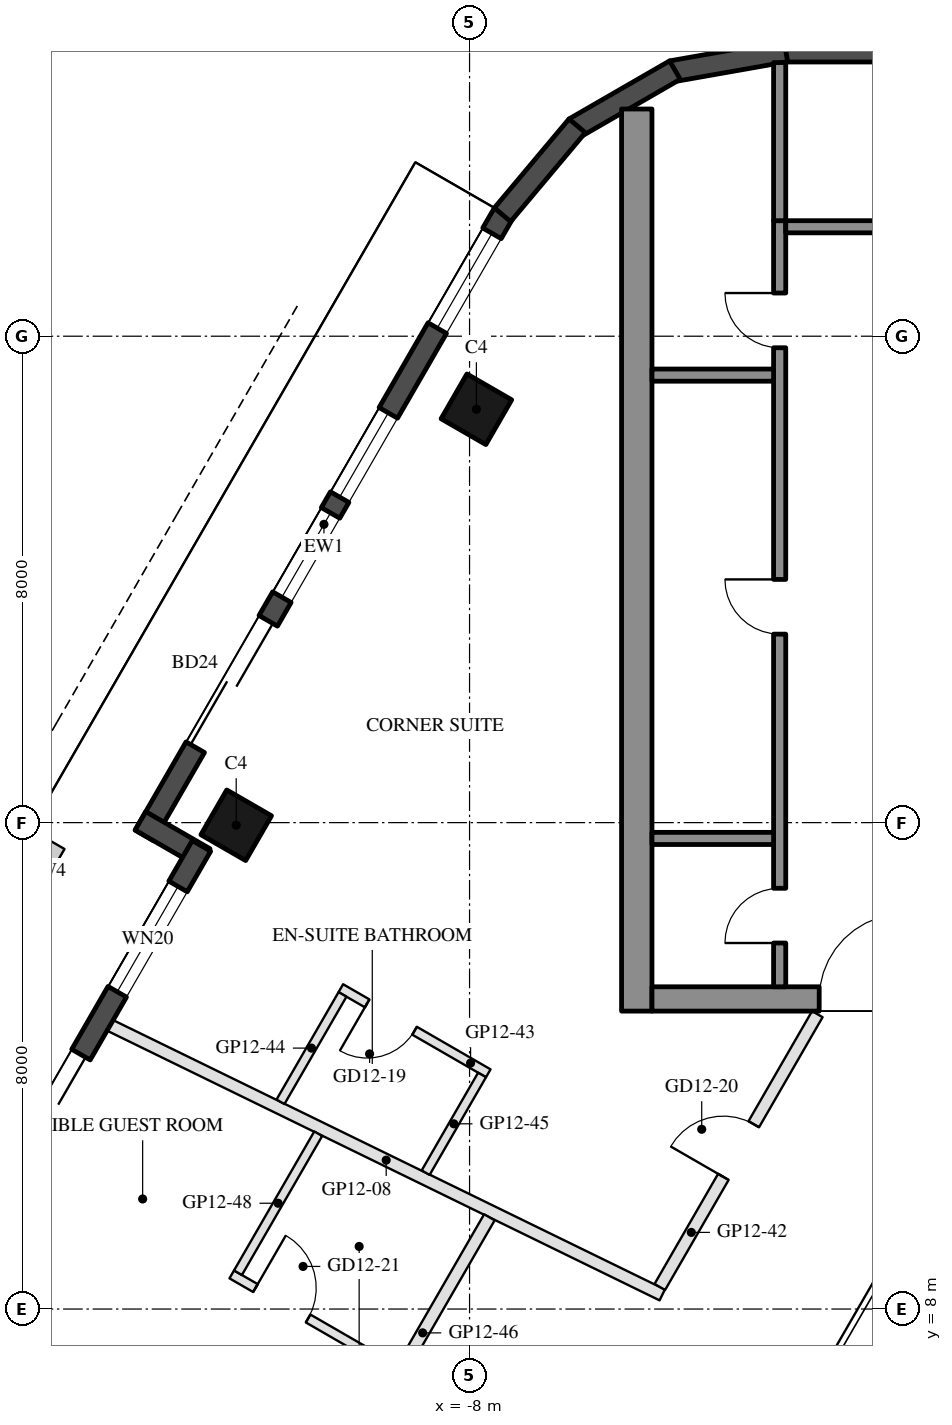
"""IFC4 building model, lengths in metres.
Left out: names, types, materials, properties, quantities, classifications, styles, units other than length and angle.
Written with IfcOpenShell. Run it as: python <this file> out.ifc"""

import sys

from ifc_helpers import new_model, si_unit, direction, frame, frame_2d, origin, origin_2d, place, context, subcontext, project, spatial, rectangle, hollow_rectangle, extrude, element, fill, save


model = new_model("IFC4")
c1 = context("Model", 3, precision=1e-05, world=origin(), true_north=direction((0.0, 1.0)))
c2 = subcontext(c1, "Body", "Model", "MODEL_VIEW")
j1 = project(units=[si_unit("LENGTHUNIT", "METRE"), si_unit("PLANEANGLEUNIT", "RADIAN")], contexts=[c1])
p1 = place(None, origin())
s1 = spatial("IfcSite", under=j1, at=p1, CompositionType="ELEMENT")
p2 = place(p1, origin())
s2 = spatial("IfcBuilding", under=s1, at=p2, CompositionType="ELEMENT")
p3 = place(p2, frame((0.0, 0.0, 146.6)))
s3 = spatial("IfcBuildingStorey", under=s2, at=p3, CompositionType="ELEMENT", Elevation=146.6)
for number, where, z_axis, x_axis in (
    (1, (-7.888, 22.798, 0.0), (0.0, 0.0, 1.0), (0.5, 0.866, 0.0)),
    (2, (-11.838, 15.957, 0.0), (0.0, 0.0, 1.0), (0.5, 0.866, 0.0)),
):
    element("IfcColumn", number, at=place(p3, frame(where, z_axis=z_axis, x_axis=x_axis)), inside=s3, PredefinedType="COLUMN", context=c2, shape_type="SweptSolid", body=[
        extrude(hollow_rectangle(XDim=0.85, YDim=0.85, WallThickness=0.04, at=origin_2d()), origin(), (0.0, 0.0, 1.0), 3.7),
    ])
p4 = place(p3, frame((-7.441, 26.022, 0.0), z_axis=(0.0, 0.0, 1.0), x_axis=(-0.499992533062, -0.86602971478, 0.0)))
e3 = element("IfcWall", 3, at=p4, inside=s3, PredefinedType="SOLIDWALL", context=c2, shape_type="SweptSolid", body=[
    extrude(rectangle(XDim=11.816, YDim=0.35, at=frame_2d((5.908, 0.0))), origin(), (0.0, 0.0, 1.0), 3.55),
])
p5 = place(p4, frame((0.381, 0.0, 0.3)))
e4 = element("IfcOpeningElement", 4, at=p5, cuts=e3, PredefinedType="OPENING", context=c2, shape_type="SweptSolid", body=[
    extrude(rectangle(XDim=1.8, YDim=2.65, at=frame_2d((0.9, 1.325))), frame((0.0, 0.185, 0.0), z_axis=(0.0, -1.0, 0.0), x_axis=(1.0, 0.0, 0.0)), (0.0, 0.0, 1.0), 0.37),
])
p6 = place(p4, frame((7.74, 0.0, 0.0)))
e5 = element("IfcOpeningElement", 5, at=p6, cuts=e3, PredefinedType="OPENING", context=c2, shape_type="SweptSolid", body=[
    extrude(rectangle(XDim=2.4, YDim=2.4, at=frame_2d((1.2, 1.2))), frame((0.0, 0.185, 0.0), z_axis=(0.0, -1.0, 0.0), x_axis=(1.0, 0.0, 0.0)), (0.0, 0.0, 1.0), 0.37),
])
p7 = place(p4, frame((3.791, 0.0, 0.3)))
e6 = element("IfcOpeningElement", 6, at=p7, cuts=e3, PredefinedType="OPENING", context=c2, shape_type="SweptSolid", body=[
    extrude(rectangle(XDim=1.6, YDim=2.65, at=frame_2d((0.8, 1.325))), frame((0.0, 0.185, 0.0), z_axis=(0.0, -1.0, 0.0), x_axis=(1.0, 0.0, 0.0)), (0.0, 0.0, 1.0), 0.37),
])
p8 = place(p4, frame((5.691, 0.0, 0.3)))
e7 = element("IfcOpeningElement", 7, at=p8, cuts=e3, PredefinedType="OPENING", context=c2, shape_type="SweptSolid", body=[
    extrude(rectangle(XDim=1.6, YDim=2.65, at=frame_2d((0.8, 1.325))), frame((0.0, 0.185, 0.0), z_axis=(0.0, -1.0, 0.0), x_axis=(1.0, 0.0, 0.0)), (0.0, 0.0, 1.0), 0.37),
])
p9 = place(p3, frame((-13.413, 16.029, 0.0), z_axis=(0.0, 0.0, 1.0), x_axis=(0.866005645448, -0.500034220881, 0.0)))
e8 = element("IfcWall", 8, at=p9, inside=s3, PredefinedType="SOLIDWALL", context=c2, shape_type="SweptSolid", body=[
    extrude(rectangle(XDim=1.22, YDim=0.35, at=frame_2d((0.61, 0.0))), origin(), (0.0, 0.0, 1.0), 3.55),
])
p10 = place(p3, frame((-12.409, 15.617, 0.0), z_axis=(0.0, 0.0, 1.0), x_axis=(-0.500003597184, -0.866023326939, 0.0)))
e9 = element("IfcWall", 9, at=p10, inside=s3, PredefinedType="SOLIDWALL", context=c2, shape_type="SweptSolid", body=[
    extrude(rectangle(XDim=6.74, YDim=0.35, at=frame_2d((3.37, 0.0))), origin(), (0.0, 0.0, 1.0), 3.55),
])
p11 = place(p10, frame((0.77, 0.0, 0.3)))
e10 = element("IfcOpeningElement", 10, at=p11, cuts=e9, PredefinedType="OPENING", context=c2, shape_type="SweptSolid", body=[
    extrude(rectangle(XDim=2.0, YDim=2.65, at=frame_2d((1.0, 1.325))), frame((0.0, 0.185, 0.0), z_axis=(0.0, -1.0, 0.0), x_axis=(1.0, 0.0, 0.0)), (0.0, 0.0, 1.0), 0.37),
])
p12 = place(p10, frame((3.964, 0.0, 0.0)))
e11 = element("IfcOpeningElement", 11, at=p12, cuts=e9, PredefinedType="OPENING", context=c2, shape_type="SweptSolid", body=[
    extrude(rectangle(XDim=1.8, YDim=2.4, at=frame_2d((0.9, 1.2))), frame((0.0, 0.185, 0.0), z_axis=(0.0, -1.0, 0.0), x_axis=(1.0, 0.0, 0.0)), (0.0, 0.0, 1.0), 0.37),
])
p13 = place(p3, frame((2.829, 28.685, 0.0), z_axis=(0.0, 0.0, 1.0), x_axis=(-1.0, 0.0, 0.0)))
e12 = element("IfcWall", 12, at=p13, inside=s3, PredefinedType="SOLIDWALL", context=c2, shape_type="SweptSolid", body=[
    extrude(rectangle(XDim=5.658, YDim=0.35, at=frame_2d((2.829, 0.0))), origin(), (0.0, 0.0, 1.0), 3.55),
])
for number, where, z_axis, x_axis in (
    (13, (-2.799, 28.688, 0.0), (0.0, 0.0, 1.0), (-0.985, -0.174, 0.0)),
    (14, (-4.623, 28.377, 0.0), (0.0, 0.0, 1.0), (-0.866, -0.5, 0.0)),
):
    element("IfcWall", number, at=place(p3, frame(where, z_axis=z_axis, x_axis=x_axis)), inside=s3, PredefinedType="SOLIDWALL", context=c2, shape_type="SweptSolid", body=[
        extrude(rectangle(XDim=1.91, YDim=0.35, at=frame_2d((0.955, 0.0))), origin(), (0.0, 0.0, 1.0), 3.55),
    ])
p14 = place(p3, frame((-6.23, 27.461, 0.0), z_axis=(0.0, 0.0, 1.0), x_axis=(-0.642808304945, -0.766027077259, 0.0)))
e15 = element("IfcWall", 15, at=p14, inside=s3, PredefinedType="SOLIDWALL", context=c2, shape_type="SweptSolid", body=[
    extrude(rectangle(XDim=1.91, YDim=0.35, at=frame_2d((0.955, 0.0))), origin(), (0.0, 0.0, 1.0), 3.55),
])
p15 = place(p3, frame((-5.25, 12.9, 0.0), z_axis=(0.0, 0.0, 1.0), x_axis=(0.0, 1.0, 0.0)))
e16 = element("IfcWall", 16, at=p15, inside=s3, PredefinedType="SHEAR", context=c2, shape_type="SweptSolid", body=[
    extrude(rectangle(XDim=14.837, YDim=0.5, at=frame_2d((7.418, 0.0))), origin(), (0.0, 0.0, 1.0), 3.5),
])
p16 = place(p3, frame((5.0, 13.1, 0.0), z_axis=(0.0, 0.0, 1.0), x_axis=(-1.0, 0.0, 0.0)))
e17 = element("IfcWall", 17, at=p16, inside=s3, PredefinedType="SHEAR", context=c2, shape_type="SweptSolid", body=[
    extrude(rectangle(XDim=10.0, YDim=0.4, at=frame_2d((5.0, 0.0))), origin(), (0.0, 0.0, 1.0), 3.5),
])
p17 = place(p16, frame((3.55, 0.0, 0.0)))
e18 = element("IfcOpeningElement", 18, at=p17, cuts=e17, PredefinedType="OPENING", context=c2, shape_type="SweptSolid", body=[
    extrude(rectangle(XDim=1.1, YDim=2.1, at=frame_2d((0.55, 1.05))), frame((0.0, 0.21, 0.0), z_axis=(0.0, -1.0, 0.0), x_axis=(1.0, 0.0, 0.0)), (0.0, 0.0, 1.0), 0.42),
])
p18 = place(p16, frame((5.85, 0.0, 0.0)))
e19 = element("IfcOpeningElement", 19, at=p18, cuts=e17, PredefinedType="OPENING", context=c2, shape_type="SweptSolid", body=[
    extrude(rectangle(XDim=1.4, YDim=2.1, at=frame_2d((0.7, 1.05))), frame((0.0, 0.21, 0.0), z_axis=(0.0, -1.0, 0.0), x_axis=(1.0, 0.0, 0.0)), (0.0, 0.0, 1.0), 0.42),
])
p19 = place(p3, frame((-2.9, 13.3, 0.0), z_axis=(0.0, 0.0, 1.0), x_axis=(0.0, 1.0, 0.0)))
e20 = element("IfcWall", 20, at=p19, inside=s3, PredefinedType="SHEAR", context=c2, shape_type="SweptSolid", body=[
    extrude(rectangle(XDim=12.6, YDim=0.2, at=frame_2d((6.3, 0.0))), origin(), (0.0, 0.0, 1.0), 3.5),
])
p20 = place(p19, frame((0.72, 0.0, 0.0)))
e21 = element("IfcOpeningElement", 21, at=p20, cuts=e20, PredefinedType="OPENING", context=c2, shape_type="SweptSolid", body=[
    extrude(rectangle(XDim=0.9, YDim=2.1, at=frame_2d((0.45, 1.05))), frame((0.0, 0.11, 0.0), z_axis=(0.0, -1.0, 0.0), x_axis=(1.0, 0.0, 0.0)), (0.0, 0.0, 1.0), 0.22),
])
p21 = place(p19, frame((5.8, 0.0, 0.0)))
e22 = element("IfcOpeningElement", 22, at=p21, cuts=e20, PredefinedType="OPENING", context=c2, shape_type="SweptSolid", body=[
    extrude(rectangle(XDim=0.9, YDim=2.1, at=frame_2d((0.45, 1.05))), frame((0.0, 0.11, 0.0), z_axis=(0.0, -1.0, 0.0), x_axis=(1.0, 0.0, 0.0)), (0.0, 0.0, 1.0), 0.22),
])
p22 = place(p19, frame((10.51, 0.0, 0.0)))
e23 = element("IfcOpeningElement", 23, at=p22, cuts=e20, PredefinedType="OPENING", context=c2, shape_type="SweptSolid", body=[
    extrude(rectangle(XDim=0.9, YDim=2.1, at=frame_2d((0.45, 1.05))), frame((0.0, 0.11, 0.0), z_axis=(0.0, -1.0, 0.0), x_axis=(1.0, 0.0, 0.0)), (0.0, 0.0, 1.0), 0.22),
])
p23 = place(p3, frame((-0.4, 25.8, 0.0), z_axis=(0.0, 0.0, 1.0), x_axis=(-1.0, 0.0, 0.0)))
e24 = element("IfcWall", 24, at=p23, inside=s3, PredefinedType="SHEAR", context=c2, shape_type="SweptSolid", body=[
    extrude(rectangle(XDim=2.4, YDim=0.2, at=frame_2d((1.2, 0.0))), origin(), (0.0, 0.0, 1.0), 3.5),
])
for number, where, z_axis, x_axis in (
    (25, (-3.0, 15.74, 0.0), (0.0, 0.0, 1.0), (-1.0, 0.0, 0.0)),
    (26, (-3.0, 23.36, 0.0), (0.0, 0.0, 1.0), (-1.0, 0.0, 0.0)),
):
    element("IfcWall", number, at=place(p3, frame(where, z_axis=z_axis, x_axis=x_axis)), inside=s3, PredefinedType="SHEAR", context=c2, shape_type="SweptSolid", body=[
        extrude(rectangle(XDim=2.0, YDim=0.2, at=frame_2d((1.0, 0.0))), origin(), (0.0, 0.0, 1.0), 3.5),
    ])
p24 = place(p3, frame((-2.9, 25.9, 0.0), z_axis=(0.0, 0.0, 1.0), x_axis=(0.0, 1.0, 0.0)))
e27 = element("IfcWall", 27, at=p24, inside=s3, PredefinedType="SHEAR", context=c2, shape_type="SweptSolid", body=[
    extrude(rectangle(XDim=2.6, YDim=0.2, at=frame_2d((1.3, 0.0))), origin(), (0.0, 0.0, 1.0), 3.5),
])
p25 = place(p3, frame((-13.911, 12.665, 0.0), z_axis=(0.0, 0.0, 1.0), x_axis=(0.898639294085, -0.438688293811, 0.0)))
e28 = element("IfcWall", 28, at=p25, inside=s3, PredefinedType="PARTITIONING", context=c2, shape_type="SweptSolid", body=[
    extrude(rectangle(XDim=10.104, YDim=0.2, at=frame_2d((5.052, 0.0))), origin(), (0.0, 0.0, 1.0), 2.95),
])
p26 = place(p3, frame((-17.412, 8.402, 0.0), z_axis=(0.0, 0.0, 1.0), x_axis=(0.880917469793, -0.473269913912, 0.0)))
e29 = element("IfcWall", 29, at=p26, inside=s3, PredefinedType="PARTITIONING", context=c2, shape_type="SweptSolid", body=[
    extrude(rectangle(XDim=7.984, YDim=0.2, at=frame_2d((3.992, 0.0))), origin(), (0.0, 0.0, 1.0), 3.06),
])
p27 = place(p3, frame((-4.871, 8.363, 0.0), z_axis=(0.0, 0.0, 1.0), x_axis=(0.500016142392, 0.86601608377, 0.0)))
e30 = element("IfcWall", 30, at=p27, inside=s3, PredefinedType="PARTITIONING", context=c2, shape_type="SweptSolid", body=[
    extrude(rectangle(XDim=5.181, YDim=0.2, at=frame_2d((2.59, 0.0))), origin(), (0.0, 0.0, 1.0), 2.95),
])
p28 = place(p27, frame((2.09, 0.0, 0.0)))
e31 = element("IfcOpeningElement", 31, at=p28, cuts=e30, PredefinedType="OPENING", context=c2, shape_type="SweptSolid", body=[
    extrude(rectangle(XDim=1.0, YDim=2.1, at=frame_2d((0.5, 1.05))), frame((0.0, 0.11, 0.0), z_axis=(0.0, -1.0, 0.0), x_axis=(1.0, 0.0, 0.0)), (0.0, 0.0, 1.0), 0.22),
])
p29 = place(p3, frame((-7.692, 11.877, 0.0), z_axis=(0.0, 0.0, 1.0), x_axis=(-0.866034573852, 0.49998411664, 0.0)))
e32 = element("IfcWall", 32, at=p29, inside=s3, PredefinedType="PARTITIONING", context=c2, shape_type="SweptSolid", body=[
    extrude(rectangle(XDim=2.8, YDim=0.15, at=frame_2d((1.4, 0.0))), origin(), (0.0, 0.0, 1.0), 3.55),
])
p30 = place(p29, frame((1.4, 0.0, 0.0)))
e33 = element("IfcOpeningElement", 33, at=p30, cuts=e32, PredefinedType="OPENING", context=c2, shape_type="SweptSolid", body=[
    extrude(rectangle(XDim=0.9, YDim=2.1, at=frame_2d((0.45, 1.05))), frame((0.0, 0.085, 0.0), z_axis=(0.0, -1.0, 0.0), x_axis=(1.0, 0.0, 0.0)), (0.0, 0.0, 1.0), 0.17),
])
p31 = place(p3, frame((-10.089, 13.175, 0.0), z_axis=(0.0, 0.0, 1.0), x_axis=(-0.499988401207, -0.866032100247, 0.0)))
e34 = element("IfcWall", 34, at=p31, inside=s3, PredefinedType="PARTITIONING", context=c2, shape_type="SweptSolid", body=[
    extrude(rectangle(XDim=2.04, YDim=0.15, at=frame_2d((1.02, 0.0))), origin(), (0.0, 0.0, 1.0), 3.55),
])
p32 = place(p3, frame((-7.794, 11.85, 0.0), z_axis=(0.0, 0.0, 1.0), x_axis=(-0.500003477455, -0.866023396066, 0.0)))
e35 = element("IfcWall", 35, at=p32, inside=s3, PredefinedType="PARTITIONING", context=c2, shape_type="SweptSolid", body=[
    extrude(rectangle(XDim=1.855, YDim=0.15, at=frame_2d((0.927, 0.0))), origin(), (0.0, 0.0, 1.0), 3.55),
])
p33 = place(p3, frame((-10.417, 4.757, 0.0), z_axis=(0.0, 0.0, 1.0), x_axis=(0.50000105825, 0.866024792803, 0.0)))
e36 = element("IfcWall", 36, at=p33, inside=s3, PredefinedType="PARTITIONING", context=c2, shape_type="SweptSolid", body=[
    extrude(rectangle(XDim=5.487, YDim=0.2, at=frame_2d((2.743, 0.0))), origin(), (0.0, 0.0, 1.0), 2.95),
])
p34 = place(p33, frame((1.03, 0.0, 0.0)))
e37 = element("IfcOpeningElement", 37, at=p34, cuts=e36, PredefinedType="OPENING", context=c2, shape_type="SweptSolid", body=[
    extrude(rectangle(XDim=1.0, YDim=2.1, at=frame_2d((0.5, 1.05))), frame((0.0, 0.11, 0.0), z_axis=(0.0, -1.0, 0.0), x_axis=(1.0, 0.0, 0.0)), (0.0, 0.0, 1.0), 0.22),
])
p35 = place(p3, frame((-11.911, 8.57, 0.0), z_axis=(0.0, 0.0, 1.0), x_axis=(0.86600983753, -0.500026960575, 0.0)))
e38 = element("IfcWall", 38, at=p35, inside=s3, PredefinedType="PARTITIONING", context=c2, shape_type="SweptSolid", body=[
    extrude(rectangle(XDim=3.1, YDim=0.15, at=frame_2d((1.55, 0.0))), origin(), (0.0, 0.0, 1.0), 3.55),
])
p36 = place(p35, frame((0.45, 0.0, 0.0)))
e39 = element("IfcOpeningElement", 39, at=p36, cuts=e38, PredefinedType="OPENING", context=c2, shape_type="SweptSolid", body=[
    extrude(rectangle(XDim=1.0, YDim=2.1, at=frame_2d((0.5, 1.05))), frame((0.0, 0.085, 0.0), z_axis=(0.0, -1.0, 0.0), x_axis=(1.0, 0.0, 0.0)), (0.0, 0.0, 1.0), 0.17),
])
p37 = place(p3, frame((-10.489, 10.883, 0.0), z_axis=(0.0, 0.0, 1.0), x_axis=(-0.500018690203, -0.866014612722, 0.0)))
e40 = element("IfcWall", 40, at=p37, inside=s3, PredefinedType="PARTITIONING", context=c2, shape_type="SweptSolid", body=[
    extrude(rectangle(XDim=2.64, YDim=0.15, at=frame_2d((1.32, 0.0))), origin(), (0.0, 0.0, 1.0), 2.95),
])
p38 = place(p5, origin())
e41 = element("IfcWindow", 41, at=p38, inside=s3, PartitioningType="SINGLE_PANEL", PredefinedType="WINDOW", context=c2, shape_type="SweptSolid", body=[
    extrude(rectangle(XDim=1.8, YDim=2.65, at=frame_2d((0.9, 1.325))), frame((0.0, 0.03, 0.0), z_axis=(0.0, -1.0, 0.0), x_axis=(1.0, 0.0, 0.0)), (0.0, 0.0, 1.0), 0.06),
])
fill(e4, e41)
p39 = place(p6, frame((2.4, 0.0, 0.0), z_axis=(0.0, 0.0, 1.0), x_axis=(-1.0, 0.0, 0.0)))
e42 = element("IfcDoor", 42, at=p39, inside=s3, OperationType="SLIDING_TO_LEFT", PredefinedType="DOOR", context=c2, shape_type="SweptSolid", body=[
    extrude(rectangle(XDim=2.4, YDim=2.4, at=frame_2d((1.2, 1.2))), frame((0.0, 0.025, 0.0), z_axis=(0.0, -1.0, 0.0), x_axis=(1.0, 0.0, 0.0)), (0.0, 0.0, 1.0), 0.05),
])
fill(e5, e42)
p40 = place(p7, origin())
e43 = element("IfcWindow", 43, at=p40, inside=s3, PartitioningType="SINGLE_PANEL", PredefinedType="WINDOW", context=c2, shape_type="SweptSolid", body=[
    extrude(rectangle(XDim=1.6, YDim=2.65, at=frame_2d((0.8, 1.325))), frame((0.0, 0.03, 0.0), z_axis=(0.0, -1.0, 0.0), x_axis=(1.0, 0.0, 0.0)), (0.0, 0.0, 1.0), 0.06),
])
fill(e6, e43)
p41 = place(p8, origin())
e44 = element("IfcWindow", 44, at=p41, inside=s3, PartitioningType="SINGLE_PANEL", PredefinedType="WINDOW", context=c2, shape_type="SweptSolid", body=[
    extrude(rectangle(XDim=1.6, YDim=2.65, at=frame_2d((0.8, 1.325))), frame((0.0, 0.03, 0.0), z_axis=(0.0, -1.0, 0.0), x_axis=(1.0, 0.0, 0.0)), (0.0, 0.0, 1.0), 0.06),
])
fill(e7, e44)
p42 = place(p11, origin())
e45 = element("IfcWindow", 45, at=p42, inside=s3, PartitioningType="SINGLE_PANEL", PredefinedType="WINDOW", context=c2, shape_type="SweptSolid", body=[
    extrude(rectangle(XDim=2.0, YDim=2.65, at=frame_2d((1.0, 1.325))), frame((0.0, 0.03, 0.0), z_axis=(0.0, -1.0, 0.0), x_axis=(1.0, 0.0, 0.0)), (0.0, 0.0, 1.0), 0.06),
])
fill(e10, e45)
p43 = place(p12, frame((1.8, 0.0, 0.0), z_axis=(0.0, 0.0, 1.0), x_axis=(-1.0, 0.0, 0.0)))
e46 = element("IfcDoor", 46, at=p43, inside=s3, OperationType="SLIDING_TO_LEFT", PredefinedType="DOOR", context=c2, shape_type="SweptSolid", body=[
    extrude(rectangle(XDim=1.8, YDim=2.4, at=frame_2d((0.9, 1.2))), frame((0.0, 0.025, 0.0), z_axis=(0.0, -1.0, 0.0), x_axis=(1.0, 0.0, 0.0)), (0.0, 0.0, 1.0), 0.05),
])
fill(e11, e46)
p44 = place(p20, origin())
e47 = element("IfcDoor", 47, at=p44, inside=s3, OperationType="SINGLE_SWING_LEFT", PredefinedType="DOOR", context=c2, shape_type="SweptSolid", body=[
    extrude(rectangle(XDim=0.9, YDim=2.1, at=frame_2d((0.45, 1.05))), frame((0.0, 0.025, 0.0), z_axis=(0.0, -1.0, 0.0), x_axis=(1.0, 0.0, 0.0)), (0.0, 0.0, 1.0), 0.05),
])
fill(e21, e47)
p45 = place(p21, origin())
e48 = element("IfcDoor", 48, at=p45, inside=s3, OperationType="SINGLE_SWING_RIGHT", PredefinedType="DOOR", context=c2, shape_type="SweptSolid", body=[
    extrude(rectangle(XDim=0.9, YDim=2.1, at=frame_2d((0.45, 1.05))), frame((0.0, 0.025, 0.0), z_axis=(0.0, -1.0, 0.0), x_axis=(1.0, 0.0, 0.0)), (0.0, 0.0, 1.0), 0.05),
])
fill(e22, e48)
p46 = place(p22, origin())
e49 = element("IfcDoor", 49, at=p46, inside=s3, OperationType="SINGLE_SWING_RIGHT", PredefinedType="DOOR", context=c2, shape_type="SweptSolid", body=[
    extrude(rectangle(XDim=0.9, YDim=2.1, at=frame_2d((0.45, 1.05))), frame((0.0, 0.025, 0.0), z_axis=(0.0, -1.0, 0.0), x_axis=(1.0, 0.0, 0.0)), (0.0, 0.0, 1.0), 0.05),
])
fill(e23, e49)
p47 = place(p18, frame((1.4, 0.0, 0.0), z_axis=(0.0, 0.0, 1.0), x_axis=(-1.0, 0.0, 0.0)))
e50 = element("IfcDoor", 50, at=p47, inside=s3, OperationType="DOUBLE_DOOR_SINGLE_SWING", PredefinedType="DOOR", context=c2, shape_type="SweptSolid", body=[
    extrude(rectangle(XDim=1.4, YDim=2.1, at=frame_2d((0.7, 1.05))), frame((0.0, 0.025, 0.0), z_axis=(0.0, -1.0, 0.0), x_axis=(1.0, 0.0, 0.0)), (0.0, 0.0, 1.0), 0.05),
])
fill(e19, e50)
p48 = place(p30, origin())
e51 = element("IfcDoor", 51, at=p48, inside=s3, OperationType="SINGLE_SWING_RIGHT", PredefinedType="DOOR", context=c2, shape_type="SweptSolid", body=[
    extrude(rectangle(XDim=0.9, YDim=2.1, at=frame_2d((0.45, 1.05))), frame((0.0, 0.025, 0.0), z_axis=(0.0, -1.0, 0.0), x_axis=(1.0, 0.0, 0.0)), (0.0, 0.0, 1.0), 0.05),
])
fill(e33, e51)
p49 = place(p28, origin())
e52 = element("IfcDoor", 52, at=p49, inside=s3, OperationType="SINGLE_SWING_LEFT", PredefinedType="DOOR", context=c2, shape_type="SweptSolid", body=[
    extrude(rectangle(XDim=1.0, YDim=2.1, at=frame_2d((0.5, 1.05))), frame((0.0, 0.025, 0.0), z_axis=(0.0, -1.0, 0.0), x_axis=(1.0, 0.0, 0.0)), (0.0, 0.0, 1.0), 0.05),
])
fill(e31, e52)
p50 = place(p36, origin())
e53 = element("IfcDoor", 53, at=p50, inside=s3, OperationType="SINGLE_SWING_LEFT", PredefinedType="DOOR", context=c2, shape_type="SweptSolid", body=[
    extrude(rectangle(XDim=1.0, YDim=2.1, at=frame_2d((0.5, 1.05))), frame((0.0, 0.025, 0.0), z_axis=(0.0, -1.0, 0.0), x_axis=(1.0, 0.0, 0.0)), (0.0, 0.0, 1.0), 0.05),
])
fill(e39, e53)
save(model, sys.argv[1])
